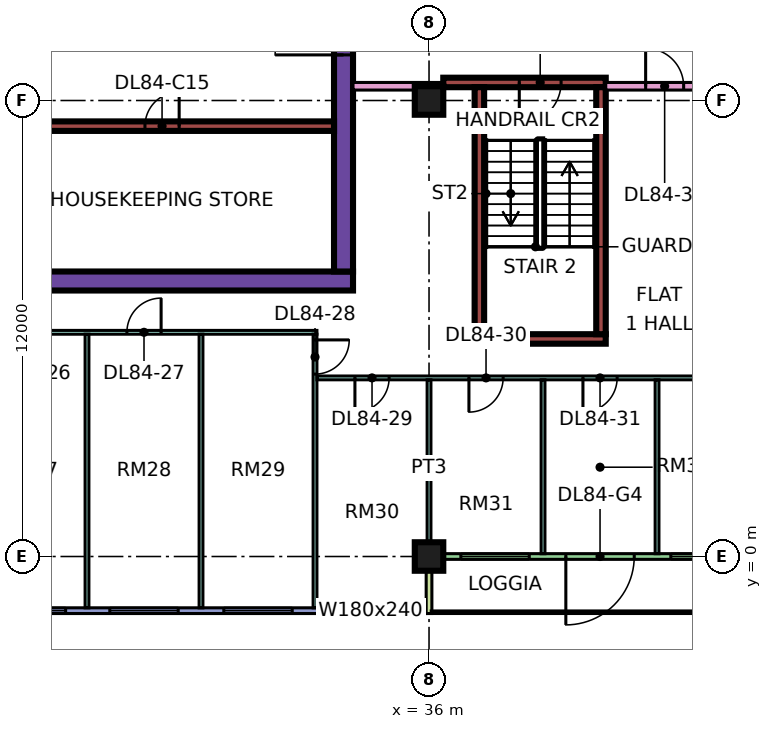
"""IFC4 building model, lengths in metres.
Left out: names, types, materials, properties, quantities, classifications, styles, units other than length and angle.
Written with IfcOpenShell. Run it as: python <this file> out.ifc"""

import sys

from ifc_helpers import new_model, si_unit, direction, frame, frame_2d, origin, origin_2d, place, context, subcontext, project, spatial, rectangle, extrude, element, fill, save


model = new_model("IFC4")
c1 = context("Model", 3, precision=1e-05, world=origin(), true_north=direction((0.0, 1.0)))
c2 = subcontext(c1, "Body", "Model", "MODEL_VIEW")
j1 = project(units=[si_unit("LENGTHUNIT", "METRE"), si_unit("PLANEANGLEUNIT", "RADIAN")], contexts=[c1])
p1 = place(None, origin())
s1 = spatial("IfcSite", under=j1, at=p1, CompositionType="ELEMENT")
p2 = place(p1, origin())
s2 = spatial("IfcBuilding", under=s1, at=p2, CompositionType="ELEMENT")
p3 = place(p2, frame((0.0, 0.0, 361.4)))
s3 = spatial("IfcBuildingStorey", under=s2, at=p3, CompositionType="ELEMENT", Elevation=361.4)
for number, where, z_axis, x_axis in (
    (1, (36.0, 0.0, 0.0), (0.0, 0.0, 1.0), (1.0, 0.0, 0.0)),
    (2, (36.0, 12.0, 0.0), (0.0, 0.0, 1.0), (1.0, 0.0, 0.0)),
):
    element("IfcColumn", number, at=place(p3, frame(where, z_axis=z_axis, x_axis=x_axis)), inside=s3, PredefinedType="COLUMN", context=c2, shape_type="SweptSolid", body=[
        extrude(rectangle(XDim=0.75, YDim=0.75, at=origin_2d()), origin(), (0.0, 0.0, 1.0), 3.75),
    ])
p4 = place(p3, frame((9.0, 7.25, 0.0), z_axis=(0.0, 0.0, 1.0), x_axis=(1.0, 0.0, 0.0)))
e3 = element("IfcWall", 3, at=p4, inside=s3, PredefinedType="SHEAR", context=c2, shape_type="SweptSolid", body=[
    extrude(rectangle(XDim=25.0, YDim=0.5, at=frame_2d((12.5, 0.0))), origin(), (0.0, 0.0, 1.0), 3.75),
])
p5 = place(p3, frame((33.75, 7.5, 0.0), z_axis=(0.0, 0.0, 1.0), x_axis=(0.0, 1.0, 0.0)))
e4 = element("IfcWall", 4, at=p5, inside=s3, PredefinedType="SHEAR", context=c2, shape_type="SweptSolid", body=[
    extrude(rectangle(XDim=12.0, YDim=0.5, at=frame_2d((6.0, 0.0))), origin(), (0.0, 0.0, 1.0), 3.75),
])
p6 = place(p5, frame((5.7, 0.0, 0.0)))
e5 = element("IfcOpeningElement", 5, at=p6, cuts=e4, PredefinedType="OPENING", context=c2, shape_type="SweptSolid", body=[
    extrude(rectangle(XDim=1.8, YDim=2.4, at=frame_2d((0.9, 1.2))), frame((0.0, 0.26, 0.0), z_axis=(0.0, -1.0, 0.0), x_axis=(1.0, 0.0, 0.0)), (0.0, 0.0, 1.0), 0.52),
])
p7 = place(p3, frame((13.45, 11.325, 0.0), z_axis=(0.0, 0.0, 1.0), x_axis=(1.0, 0.0, 0.0)))
e6 = element("IfcWall", 6, at=p7, inside=s3, PredefinedType="SHEAR", context=c2, shape_type="SweptSolid", body=[
    extrude(rectangle(XDim=20.05, YDim=0.25, at=frame_2d((10.025, 0.0))), origin(), (0.0, 0.0, 1.0), 3.75),
])
p8 = place(p7, frame((1.55, 0.0, 0.0)))
e7 = element("IfcOpeningElement", 7, at=p8, cuts=e6, PredefinedType="OPENING", context=c2, shape_type="SweptSolid", body=[
    extrude(rectangle(XDim=0.9, YDim=2.1, at=frame_2d((0.45, 1.05))), frame((0.0, 0.135, 0.0), z_axis=(0.0, -1.0, 0.0), x_axis=(1.0, 0.0, 0.0)), (0.0, 0.0, 1.0), 0.27),
])
p9 = place(p7, frame((5.05, 0.0, 0.0)))
e8 = element("IfcOpeningElement", 8, at=p9, cuts=e6, PredefinedType="OPENING", context=c2, shape_type="SweptSolid", body=[
    extrude(rectangle(XDim=0.9, YDim=2.1, at=frame_2d((0.45, 1.05))), frame((0.0, 0.135, 0.0), z_axis=(0.0, -1.0, 0.0), x_axis=(1.0, 0.0, 0.0)), (0.0, 0.0, 1.0), 0.27),
])
p10 = place(p7, frame((8.425, 0.0, 0.0)))
e9 = element("IfcOpeningElement", 9, at=p10, cuts=e6, PredefinedType="OPENING", context=c2, shape_type="SweptSolid", body=[
    extrude(rectangle(XDim=0.9, YDim=2.1, at=frame_2d((0.45, 1.05))), frame((0.0, 0.135, 0.0), z_axis=(0.0, -1.0, 0.0), x_axis=(1.0, 0.0, 0.0)), (0.0, 0.0, 1.0), 0.27),
])
p11 = place(p7, frame((15.075, 0.0, 0.0)))
e10 = element("IfcOpeningElement", 10, at=p11, cuts=e6, PredefinedType="OPENING", context=c2, shape_type="SweptSolid", body=[
    extrude(rectangle(XDim=0.9, YDim=2.1, at=frame_2d((0.45, 1.05))), frame((0.0, 0.135, 0.0), z_axis=(0.0, -1.0, 0.0), x_axis=(1.0, 0.0, 0.0)), (0.0, 0.0, 1.0), 0.27),
])
p12 = place(p3, frame((37.2, 5.725, 0.0), z_axis=(0.0, 0.0, 1.0), x_axis=(1.0, 0.0, 0.0)))
e11 = element("IfcWall", 11, at=p12, inside=s3, PredefinedType="SHEAR", context=c2, shape_type="SweptSolid", body=[
    extrude(rectangle(XDim=3.45, YDim=0.25, at=frame_2d((1.725, 0.0))), origin(), (0.0, 0.0, 1.0), 3.75),
])
p13 = place(p3, frame((36.375, 12.475, 0.0), z_axis=(0.0, 0.0, 1.0), x_axis=(1.0, 0.0, 0.0)))
e12 = element("IfcWall", 12, at=p13, inside=s3, PredefinedType="SHEAR", context=c2, shape_type="SweptSolid", body=[
    extrude(rectangle(XDim=4.275, YDim=0.25, at=frame_2d((2.137, 0.0))), origin(), (0.0, 0.0, 1.0), 3.75),
])
p14 = place(p13, frame((2.0, 0.0, 0.0)))
e13 = element("IfcOpeningElement", 13, at=p14, cuts=e12, PredefinedType="OPENING", context=c2, shape_type="SweptSolid", body=[
    extrude(rectangle(XDim=1.1, YDim=2.2, at=frame_2d((0.55, 1.1))), frame((0.0, 0.135, 0.0), z_axis=(0.0, -1.0, 0.0), x_axis=(1.0, 0.0, 0.0)), (0.0, 0.0, 1.0), 0.27),
])
for number, where, z_axis, x_axis in (
    (14, (37.325, 5.85, 0.0), (0.0, 0.0, 1.0), (0.0, 1.0, 0.0)),
    (15, (40.525, 5.85, 0.0), (0.0, 0.0, 1.0), (0.0, 1.0, 0.0)),
):
    element("IfcWall", number, at=place(p3, frame(where, z_axis=z_axis, x_axis=x_axis)), inside=s3, PredefinedType="SHEAR", context=c2, shape_type="SweptSolid", body=[
        extrude(rectangle(XDim=6.5, YDim=0.25, at=frame_2d((3.25, 0.0))), origin(), (0.0, 0.0, 1.0), 3.75),
    ])
p15 = place(p3, frame((24.075, -1.425, 0.0), z_axis=(0.0, 0.0, 1.0), x_axis=(1.0, 0.0, 0.0)))
e16 = element("IfcWall", 16, at=p15, inside=s3, PredefinedType="SOLIDWALL", context=c2, shape_type="SweptSolid", body=[
    extrude(rectangle(XDim=11.85, YDim=0.15, at=frame_2d((5.925, 0.0))), origin(), (0.0, 0.0, 1.0), 3.35),
])
p16 = place(p15, frame((0.562, 0.0, 0.45)))
e17 = element("IfcOpeningElement", 17, at=p16, cuts=e16, PredefinedType="OPENING", context=c2, shape_type="SweptSolid", body=[
    extrude(rectangle(XDim=1.8, YDim=2.4, at=frame_2d((0.9, 1.2))), frame((0.0, 0.085, 0.0), z_axis=(0.0, -1.0, 0.0), x_axis=(1.0, 0.0, 0.0)), (0.0, 0.0, 1.0), 0.17),
])
p17 = place(p15, frame((3.525, 0.0, 0.45)))
e18 = element("IfcOpeningElement", 18, at=p17, cuts=e16, PredefinedType="OPENING", context=c2, shape_type="SweptSolid", body=[
    extrude(rectangle(XDim=1.8, YDim=2.4, at=frame_2d((0.9, 1.2))), frame((0.0, 0.085, 0.0), z_axis=(0.0, -1.0, 0.0), x_axis=(1.0, 0.0, 0.0)), (0.0, 0.0, 1.0), 0.17),
])
p18 = place(p15, frame((6.525, 0.0, 0.45)))
e19 = element("IfcOpeningElement", 19, at=p18, cuts=e16, PredefinedType="OPENING", context=c2, shape_type="SweptSolid", body=[
    extrude(rectangle(XDim=1.8, YDim=2.4, at=frame_2d((0.9, 1.2))), frame((0.0, 0.085, 0.0), z_axis=(0.0, -1.0, 0.0), x_axis=(1.0, 0.0, 0.0)), (0.0, 0.0, 1.0), 0.17),
])
p19 = place(p15, frame((9.488, 0.0, 0.45)))
e20 = element("IfcOpeningElement", 20, at=p19, cuts=e16, PredefinedType="OPENING", context=c2, shape_type="SweptSolid", body=[
    extrude(rectangle(XDim=1.8, YDim=2.4, at=frame_2d((0.9, 1.2))), frame((0.0, 0.085, 0.0), z_axis=(0.0, -1.0, 0.0), x_axis=(1.0, 0.0, 0.0)), (0.0, 0.0, 1.0), 0.17),
])
p20 = place(p3, frame((36.075, 0.0, 0.0), z_axis=(0.0, 0.0, 1.0), x_axis=(1.0, 0.0, 0.0)))
e21 = element("IfcWall", 21, at=p20, inside=s3, PredefinedType="SOLIDWALL", context=c2, shape_type="SweptSolid", body=[
    extrude(rectangle(XDim=11.85, YDim=0.15, at=frame_2d((5.925, 0.0))), origin(), (0.0, 0.0, 1.0), 3.35),
])
p21 = place(p20, frame((0.762, 0.0, 0.45)))
e22 = element("IfcOpeningElement", 22, at=p21, cuts=e21, PredefinedType="OPENING", context=c2, shape_type="SweptSolid", body=[
    extrude(rectangle(XDim=1.8, YDim=2.4, at=frame_2d((0.9, 1.2))), frame((0.0, 0.085, 0.0), z_axis=(0.0, -1.0, 0.0), x_axis=(1.0, 0.0, 0.0)), (0.0, 0.0, 1.0), 0.17),
])
p22 = place(p20, frame((3.525, 0.0, 0.0)))
e23 = element("IfcOpeningElement", 23, at=p22, cuts=e21, PredefinedType="OPENING", context=c2, shape_type="SweptSolid", body=[
    extrude(rectangle(XDim=1.8, YDim=2.4, at=frame_2d((0.9, 1.2))), frame((0.0, 0.085, 0.0), z_axis=(0.0, -1.0, 0.0), x_axis=(1.0, 0.0, 0.0)), (0.0, 0.0, 1.0), 0.17),
])
p23 = place(p20, frame((6.288, 0.0, 0.45)))
e24 = element("IfcOpeningElement", 24, at=p23, cuts=e21, PredefinedType="OPENING", context=c2, shape_type="SweptSolid", body=[
    extrude(rectangle(XDim=1.8, YDim=2.4, at=frame_2d((0.9, 1.2))), frame((0.0, 0.085, 0.0), z_axis=(0.0, -1.0, 0.0), x_axis=(1.0, 0.0, 0.0)), (0.0, 0.0, 1.0), 0.17),
])
p24 = place(p20, frame((10.025, 0.0, 0.45)))
e25 = element("IfcOpeningElement", 25, at=p24, cuts=e21, PredefinedType="OPENING", context=c2, shape_type="SweptSolid", body=[
    extrude(rectangle(XDim=1.2, YDim=2.4, at=frame_2d((0.6, 1.2))), frame((0.0, 0.085, 0.0), z_axis=(0.0, -1.0, 0.0), x_axis=(1.0, 0.0, 0.0)), (0.0, 0.0, 1.0), 0.17),
])
p25 = place(p3, frame((36.0, -1.5, 0.0), z_axis=(0.0, 0.0, 1.0), x_axis=(0.0, 1.0, 0.0)))
e26 = element("IfcWall", 26, at=p25, inside=s3, PredefinedType="SOLIDWALL", context=c2, shape_type="SweptSolid", body=[
    extrude(rectangle(XDim=1.5, YDim=0.15, at=frame_2d((0.75, 0.0))), origin(), (0.0, 0.0, 1.0), 3.35),
])
p26 = place(p3, frame((11.95, 5.9, 0.0), z_axis=(0.0, 0.0, 1.0), x_axis=(1.0, 0.0, 0.0)))
e27 = element("IfcWall", 27, at=p26, inside=s3, PredefinedType="PARTITIONING", context=c2, shape_type="SweptSolid", body=[
    extrude(rectangle(XDim=21.1, YDim=0.1, at=frame_2d((10.55, 0.0))), origin(), (0.0, 0.0, 1.0), 3.35),
])
p27 = place(p26, frame((1.1, 0.0, 0.0)))
e28 = element("IfcOpeningElement", 28, at=p27, cuts=e27, PredefinedType="OPENING", context=c2, shape_type="SweptSolid", body=[
    extrude(rectangle(XDim=0.9, YDim=2.1, at=frame_2d((0.45, 1.05))), frame((0.0, 0.06, 0.0), z_axis=(0.0, -1.0, 0.0), x_axis=(1.0, 0.0, 0.0)), (0.0, 0.0, 1.0), 0.12),
])
p28 = place(p26, frame((13.1, 0.0, 0.0)))
e29 = element("IfcOpeningElement", 29, at=p28, cuts=e27, PredefinedType="OPENING", context=c2, shape_type="SweptSolid", body=[
    extrude(rectangle(XDim=0.9, YDim=2.1, at=frame_2d((0.45, 1.05))), frame((0.0, 0.06, 0.0), z_axis=(0.0, -1.0, 0.0), x_axis=(1.0, 0.0, 0.0)), (0.0, 0.0, 1.0), 0.12),
])
p29 = place(p26, frame((16.1, 0.0, 0.0)))
e30 = element("IfcOpeningElement", 30, at=p29, cuts=e27, PredefinedType="OPENING", context=c2, shape_type="SweptSolid", body=[
    extrude(rectangle(XDim=0.9, YDim=2.1, at=frame_2d((0.45, 1.05))), frame((0.0, 0.06, 0.0), z_axis=(0.0, -1.0, 0.0), x_axis=(1.0, 0.0, 0.0)), (0.0, 0.0, 1.0), 0.12),
])
p30 = place(p26, frame((7.1, 0.0, 0.0)))
e31 = element("IfcOpeningElement", 31, at=p30, cuts=e27, PredefinedType="OPENING", context=c2, shape_type="SweptSolid", body=[
    extrude(rectangle(XDim=0.9, YDim=2.1, at=frame_2d((0.45, 1.05))), frame((0.0, 0.06, 0.0), z_axis=(0.0, -1.0, 0.0), x_axis=(1.0, 0.0, 0.0)), (0.0, 0.0, 1.0), 0.12),
])
for number, where, z_axis, x_axis in (
    (32, (27.0, -1.351, 0.0), (0.0, 0.0, 1.0), (0.0, 1.0, 0.0)),
    (33, (30.0, -1.351, 0.0), (0.0, 0.0, 1.0), (0.0, 1.0, 0.0)),
):
    element("IfcWall", number, at=place(p3, frame(where, z_axis=z_axis, x_axis=x_axis)), inside=s3, PredefinedType="PARTITIONING", context=c2, shape_type="SweptSolid", body=[
        extrude(rectangle(XDim=7.201, YDim=0.1, at=frame_2d((3.601, 0.0))), origin(), (0.0, 0.0, 1.0), 3.35),
    ])
p31 = place(p3, frame((33.0, -1.351, 0.0), z_axis=(0.0, 0.0, 1.0), x_axis=(0.0, 1.0, 0.0)))
e34 = element("IfcWall", 34, at=p31, inside=s3, PredefinedType="PARTITIONING", context=c2, shape_type="SweptSolid", body=[
    extrude(rectangle(XDim=7.201, YDim=0.1, at=frame_2d((3.601, 0.0))), origin(), (0.0, 0.0, 1.0), 3.35),
])
p32 = place(p31, frame((6.151, 0.0, 0.0)))
e35 = element("IfcOpeningElement", 35, at=p32, cuts=e34, PredefinedType="OPENING", context=c2, shape_type="SweptSolid", body=[
    extrude(rectangle(XDim=0.9, YDim=2.1, at=frame_2d((0.45, 1.05))), frame((0.0, 0.06, 0.0), z_axis=(0.0, -1.0, 0.0), x_axis=(1.0, 0.0, 0.0)), (0.0, 0.0, 1.0), 0.12),
])
p33 = place(p3, frame((33.05, 4.7, 0.0), z_axis=(0.0, 0.0, 1.0), x_axis=(1.0, 0.0, 0.0)))
e36 = element("IfcWall", 36, at=p33, inside=s3, PredefinedType="PARTITIONING", context=c2, shape_type="SweptSolid", body=[
    extrude(rectangle(XDim=22.301, YDim=0.1, at=frame_2d((11.15, 0.0))), origin(), (0.0, 0.0, 1.0), 3.35),
])
p34 = place(p33, frame((1.0, 0.0, 0.0)))
e37 = element("IfcOpeningElement", 37, at=p34, cuts=e36, PredefinedType="OPENING", context=c2, shape_type="SweptSolid", body=[
    extrude(rectangle(XDim=0.9, YDim=2.1, at=frame_2d((0.45, 1.05))), frame((0.0, 0.06, 0.0), z_axis=(0.0, -1.0, 0.0), x_axis=(1.0, 0.0, 0.0)), (0.0, 0.0, 1.0), 0.12),
])
p35 = place(p33, frame((4.0, 0.0, 0.0)))
e38 = element("IfcOpeningElement", 38, at=p35, cuts=e36, PredefinedType="OPENING", context=c2, shape_type="SweptSolid", body=[
    extrude(rectangle(XDim=0.9, YDim=2.1, at=frame_2d((0.45, 1.05))), frame((0.0, 0.06, 0.0), z_axis=(0.0, -1.0, 0.0), x_axis=(1.0, 0.0, 0.0)), (0.0, 0.0, 1.0), 0.12),
])
p36 = place(p33, frame((7.0, 0.0, 0.0)))
e39 = element("IfcOpeningElement", 39, at=p36, cuts=e36, PredefinedType="OPENING", context=c2, shape_type="SweptSolid", body=[
    extrude(rectangle(XDim=0.9, YDim=2.1, at=frame_2d((0.45, 1.05))), frame((0.0, 0.06, 0.0), z_axis=(0.0, -1.0, 0.0), x_axis=(1.0, 0.0, 0.0)), (0.0, 0.0, 1.0), 0.12),
])
p37 = place(p33, frame((19.0, 0.0, 0.0)))
e40 = element("IfcOpeningElement", 40, at=p37, cuts=e36, PredefinedType="OPENING", context=c2, shape_type="SweptSolid", body=[
    extrude(rectangle(XDim=0.9, YDim=2.1, at=frame_2d((0.45, 1.05))), frame((0.0, 0.06, 0.0), z_axis=(0.0, -1.0, 0.0), x_axis=(1.0, 0.0, 0.0)), (0.0, 0.0, 1.0), 0.12),
])
p38 = place(p33, frame((13.0, 0.0, 0.0)))
e41 = element("IfcOpeningElement", 41, at=p38, cuts=e36, PredefinedType="OPENING", context=c2, shape_type="SweptSolid", body=[
    extrude(rectangle(XDim=0.9, YDim=2.1, at=frame_2d((0.45, 1.05))), frame((0.0, 0.06, 0.0), z_axis=(0.0, -1.0, 0.0), x_axis=(1.0, 0.0, 0.0)), (0.0, 0.0, 1.0), 0.12),
])
p39 = place(p3, frame((34.0, 12.375, 0.0), z_axis=(0.0, 0.0, 1.0), x_axis=(1.0, 0.0, 0.0)))
e42 = element("IfcWall", 42, at=p39, inside=s3, PredefinedType="PARTITIONING", context=c2, shape_type="SweptSolid", body=[
    extrude(rectangle(XDim=2.376, YDim=0.2, at=frame_2d((1.188, 0.0))), origin(), (0.0, 0.0, 1.0), 3.35),
])
p40 = place(p3, frame((36.0, 0.0, 0.0), z_axis=(0.0, 0.0, 1.0), x_axis=(0.0, 1.0, 0.0)))
e43 = element("IfcWall", 43, at=p40, inside=s3, PredefinedType="PARTITIONING", context=c2, shape_type="SweptSolid", body=[
    extrude(rectangle(XDim=4.65, YDim=0.1, at=frame_2d((2.325, 0.0))), origin(), (0.0, 0.0, 1.0), 3.35),
])
p41 = place(p3, frame((39.0, 0.074, 0.0), z_axis=(0.0, 0.0, 1.0), x_axis=(0.0, 1.0, 0.0)))
e44 = element("IfcWall", 44, at=p41, inside=s3, PredefinedType="PARTITIONING", context=c2, shape_type="SweptSolid", body=[
    extrude(rectangle(XDim=4.576, YDim=0.1, at=frame_2d((2.288, 0.0))), origin(), (0.0, 0.0, 1.0), 3.35),
])
p42 = place(p3, frame((40.65, 12.375, 0.0), z_axis=(0.0, 0.0, 1.0), x_axis=(1.0, 0.0, 0.0)))
e45 = element("IfcWall", 45, at=p42, inside=s3, PredefinedType="PARTITIONING", context=c2, shape_type="SweptSolid", body=[
    extrude(rectangle(XDim=13.276, YDim=0.2, at=frame_2d((6.638, 0.0))), origin(), (0.0, 0.0, 1.0), 3.35),
])
p43 = place(p42, frame((1.05, 0.0, 0.0)))
e46 = element("IfcOpeningElement", 46, at=p43, cuts=e45, PredefinedType="OPENING", context=c2, shape_type="SweptSolid", body=[
    extrude(rectangle(XDim=1.0, YDim=2.1, at=frame_2d((0.5, 1.05))), frame((0.0, 0.11, 0.0), z_axis=(0.0, -1.0, 0.0), x_axis=(1.0, 0.0, 0.0)), (0.0, 0.0, 1.0), 0.22),
])
p44 = place(p3, frame((42.0, 0.074, 0.0), z_axis=(0.0, 0.0, 1.0), x_axis=(0.0, 1.0, 0.0)))
e47 = element("IfcWall", 47, at=p44, inside=s3, PredefinedType="PARTITIONING", context=c2, shape_type="SweptSolid", body=[
    extrude(rectangle(XDim=4.576, YDim=0.1, at=frame_2d((2.288, 0.0))), origin(), (0.0, 0.0, 1.0), 3.35),
])
p45 = place(p16, origin())
e48 = element("IfcWindow", 48, at=p45, inside=s3, PartitioningType="SINGLE_PANEL", PredefinedType="WINDOW", context=c2, shape_type="SweptSolid", body=[
    extrude(rectangle(XDim=1.8, YDim=2.4, at=frame_2d((0.9, 1.2))), frame((0.0, 0.03, 0.0), z_axis=(0.0, -1.0, 0.0), x_axis=(1.0, 0.0, 0.0)), (0.0, 0.0, 1.0), 0.06),
])
fill(e17, e48)
p46 = place(p17, origin())
e49 = element("IfcWindow", 49, at=p46, inside=s3, PartitioningType="SINGLE_PANEL", PredefinedType="WINDOW", context=c2, shape_type="SweptSolid", body=[
    extrude(rectangle(XDim=1.8, YDim=2.4, at=frame_2d((0.9, 1.2))), frame((0.0, 0.03, 0.0), z_axis=(0.0, -1.0, 0.0), x_axis=(1.0, 0.0, 0.0)), (0.0, 0.0, 1.0), 0.06),
])
fill(e18, e49)
p47 = place(p18, origin())
e50 = element("IfcWindow", 50, at=p47, inside=s3, PartitioningType="SINGLE_PANEL", PredefinedType="WINDOW", context=c2, shape_type="SweptSolid", body=[
    extrude(rectangle(XDim=1.8, YDim=2.4, at=frame_2d((0.9, 1.2))), frame((0.0, 0.03, 0.0), z_axis=(0.0, -1.0, 0.0), x_axis=(1.0, 0.0, 0.0)), (0.0, 0.0, 1.0), 0.06),
])
fill(e19, e50)
p48 = place(p19, origin())
e51 = element("IfcWindow", 51, at=p48, inside=s3, PartitioningType="SINGLE_PANEL", PredefinedType="WINDOW", context=c2, shape_type="SweptSolid", body=[
    extrude(rectangle(XDim=1.8, YDim=2.4, at=frame_2d((0.9, 1.2))), frame((0.0, 0.03, 0.0), z_axis=(0.0, -1.0, 0.0), x_axis=(1.0, 0.0, 0.0)), (0.0, 0.0, 1.0), 0.06),
])
fill(e20, e51)
p49 = place(p21, origin())
e52 = element("IfcWindow", 52, at=p49, inside=s3, PartitioningType="SINGLE_PANEL", PredefinedType="WINDOW", context=c2, shape_type="SweptSolid", body=[
    extrude(rectangle(XDim=1.8, YDim=2.4, at=frame_2d((0.9, 1.2))), frame((0.0, 0.03, 0.0), z_axis=(0.0, -1.0, 0.0), x_axis=(1.0, 0.0, 0.0)), (0.0, 0.0, 1.0), 0.06),
])
fill(e22, e52)
p50 = place(p22, frame((1.8, 0.0, 0.0), z_axis=(0.0, 0.0, 1.0), x_axis=(-1.0, 0.0, 0.0)))
e53 = element("IfcDoor", 53, at=p50, inside=s3, OperationType="DOUBLE_DOOR_SINGLE_SWING", PredefinedType="DOOR", context=c2, shape_type="SweptSolid", body=[
    extrude(rectangle(XDim=1.8, YDim=2.4, at=frame_2d((0.9, 1.2))), frame((0.0, 0.025, 0.0), z_axis=(0.0, -1.0, 0.0), x_axis=(1.0, 0.0, 0.0)), (0.0, 0.0, 1.0), 0.05),
])
fill(e23, e53)
p51 = place(p23, origin())
e54 = element("IfcWindow", 54, at=p51, inside=s3, PartitioningType="SINGLE_PANEL", PredefinedType="WINDOW", context=c2, shape_type="SweptSolid", body=[
    extrude(rectangle(XDim=1.8, YDim=2.4, at=frame_2d((0.9, 1.2))), frame((0.0, 0.03, 0.0), z_axis=(0.0, -1.0, 0.0), x_axis=(1.0, 0.0, 0.0)), (0.0, 0.0, 1.0), 0.06),
])
fill(e24, e54)
p52 = place(p6, origin())
e55 = element("IfcDoor", 55, at=p52, inside=s3, OperationType="DOUBLE_DOOR_SINGLE_SWING", PredefinedType="DOOR", context=c2, shape_type="SweptSolid", body=[
    extrude(rectangle(XDim=1.8, YDim=2.4, at=frame_2d((0.9, 1.2))), frame((0.0, 0.025, 0.0), z_axis=(0.0, -1.0, 0.0), x_axis=(1.0, 0.0, 0.0)), (0.0, 0.0, 1.0), 0.05),
])
fill(e5, e55)
p53 = place(p14, frame((1.1, 0.0, 0.0), z_axis=(0.0, 0.0, 1.0), x_axis=(-1.0, 0.0, 0.0)))
e56 = element("IfcDoor", 56, at=p53, inside=s3, OperationType="SINGLE_SWING_LEFT", PredefinedType="DOOR", context=c2, shape_type="SweptSolid", body=[
    extrude(rectangle(XDim=1.1, YDim=2.2, at=frame_2d((0.55, 1.1))), frame((0.0, 0.025, 0.0), z_axis=(0.0, -1.0, 0.0), x_axis=(1.0, 0.0, 0.0)), (0.0, 0.0, 1.0), 0.05),
])
fill(e13, e56)
p54 = place(p11, frame((0.9, 0.0, 0.0), z_axis=(0.0, 0.0, 1.0), x_axis=(-1.0, 0.0, 0.0)))
e57 = element("IfcDoor", 57, at=p54, inside=s3, OperationType="SINGLE_SWING_RIGHT", PredefinedType="DOOR", context=c2, shape_type="SweptSolid", body=[
    extrude(rectangle(XDim=0.9, YDim=2.1, at=frame_2d((0.45, 1.05))), frame((0.0, 0.025, 0.0), z_axis=(0.0, -1.0, 0.0), x_axis=(1.0, 0.0, 0.0)), (0.0, 0.0, 1.0), 0.05),
])
fill(e10, e57)
p55 = place(p29, frame((0.9, 0.0, 0.0), z_axis=(0.0, 0.0, 1.0), x_axis=(-1.0, 0.0, 0.0)))
e58 = element("IfcDoor", 58, at=p55, inside=s3, OperationType="SINGLE_SWING_RIGHT", PredefinedType="DOOR", context=c2, shape_type="SweptSolid", body=[
    extrude(rectangle(XDim=0.9, YDim=2.1, at=frame_2d((0.45, 1.05))), frame((0.0, 0.025, 0.0), z_axis=(0.0, -1.0, 0.0), x_axis=(1.0, 0.0, 0.0)), (0.0, 0.0, 1.0), 0.05),
])
fill(e30, e58)
p56 = place(p32, origin())
e59 = element("IfcDoor", 59, at=p56, inside=s3, OperationType="SINGLE_SWING_RIGHT", PredefinedType="DOOR", context=c2, shape_type="SweptSolid", body=[
    extrude(rectangle(XDim=0.9, YDim=2.1, at=frame_2d((0.45, 1.05))), frame((0.0, 0.025, 0.0), z_axis=(0.0, -1.0, 0.0), x_axis=(1.0, 0.0, 0.0)), (0.0, 0.0, 1.0), 0.05),
])
fill(e35, e59)
p57 = place(p34, frame((0.9, 0.0, 0.0), z_axis=(0.0, 0.0, 1.0), x_axis=(-1.0, 0.0, 0.0)))
e60 = element("IfcDoor", 60, at=p57, inside=s3, OperationType="SINGLE_SWING_LEFT", PredefinedType="DOOR", context=c2, shape_type="SweptSolid", body=[
    extrude(rectangle(XDim=0.9, YDim=2.1, at=frame_2d((0.45, 1.05))), frame((0.0, 0.025, 0.0), z_axis=(0.0, -1.0, 0.0), x_axis=(1.0, 0.0, 0.0)), (0.0, 0.0, 1.0), 0.05),
])
fill(e37, e60)
p58 = place(p35, frame((0.9, 0.0, 0.0), z_axis=(0.0, 0.0, 1.0), x_axis=(-1.0, 0.0, 0.0)))
e61 = element("IfcDoor", 61, at=p58, inside=s3, OperationType="SINGLE_SWING_LEFT", PredefinedType="DOOR", context=c2, shape_type="SweptSolid", body=[
    extrude(rectangle(XDim=0.9, YDim=2.1, at=frame_2d((0.45, 1.05))), frame((0.0, 0.025, 0.0), z_axis=(0.0, -1.0, 0.0), x_axis=(1.0, 0.0, 0.0)), (0.0, 0.0, 1.0), 0.05),
])
fill(e38, e61)
p59 = place(p36, frame((0.9, 0.0, 0.0), z_axis=(0.0, 0.0, 1.0), x_axis=(-1.0, 0.0, 0.0)))
e62 = element("IfcDoor", 62, at=p59, inside=s3, OperationType="SINGLE_SWING_LEFT", PredefinedType="DOOR", context=c2, shape_type="SweptSolid", body=[
    extrude(rectangle(XDim=0.9, YDim=2.1, at=frame_2d((0.45, 1.05))), frame((0.0, 0.025, 0.0), z_axis=(0.0, -1.0, 0.0), x_axis=(1.0, 0.0, 0.0)), (0.0, 0.0, 1.0), 0.05),
])
fill(e39, e62)
p60 = place(p43, origin())
e63 = element("IfcDoor", 63, at=p60, inside=s3, OperationType="SINGLE_SWING_LEFT", PredefinedType="DOOR", context=c2, shape_type="SweptSolid", body=[
    extrude(rectangle(XDim=1.0, YDim=2.1, at=frame_2d((0.5, 1.05))), frame((0.0, 0.025, 0.0), z_axis=(0.0, -1.0, 0.0), x_axis=(1.0, 0.0, 0.0)), (0.0, 0.0, 1.0), 0.05),
])
fill(e46, e63)
save(model, sys.argv[1])
